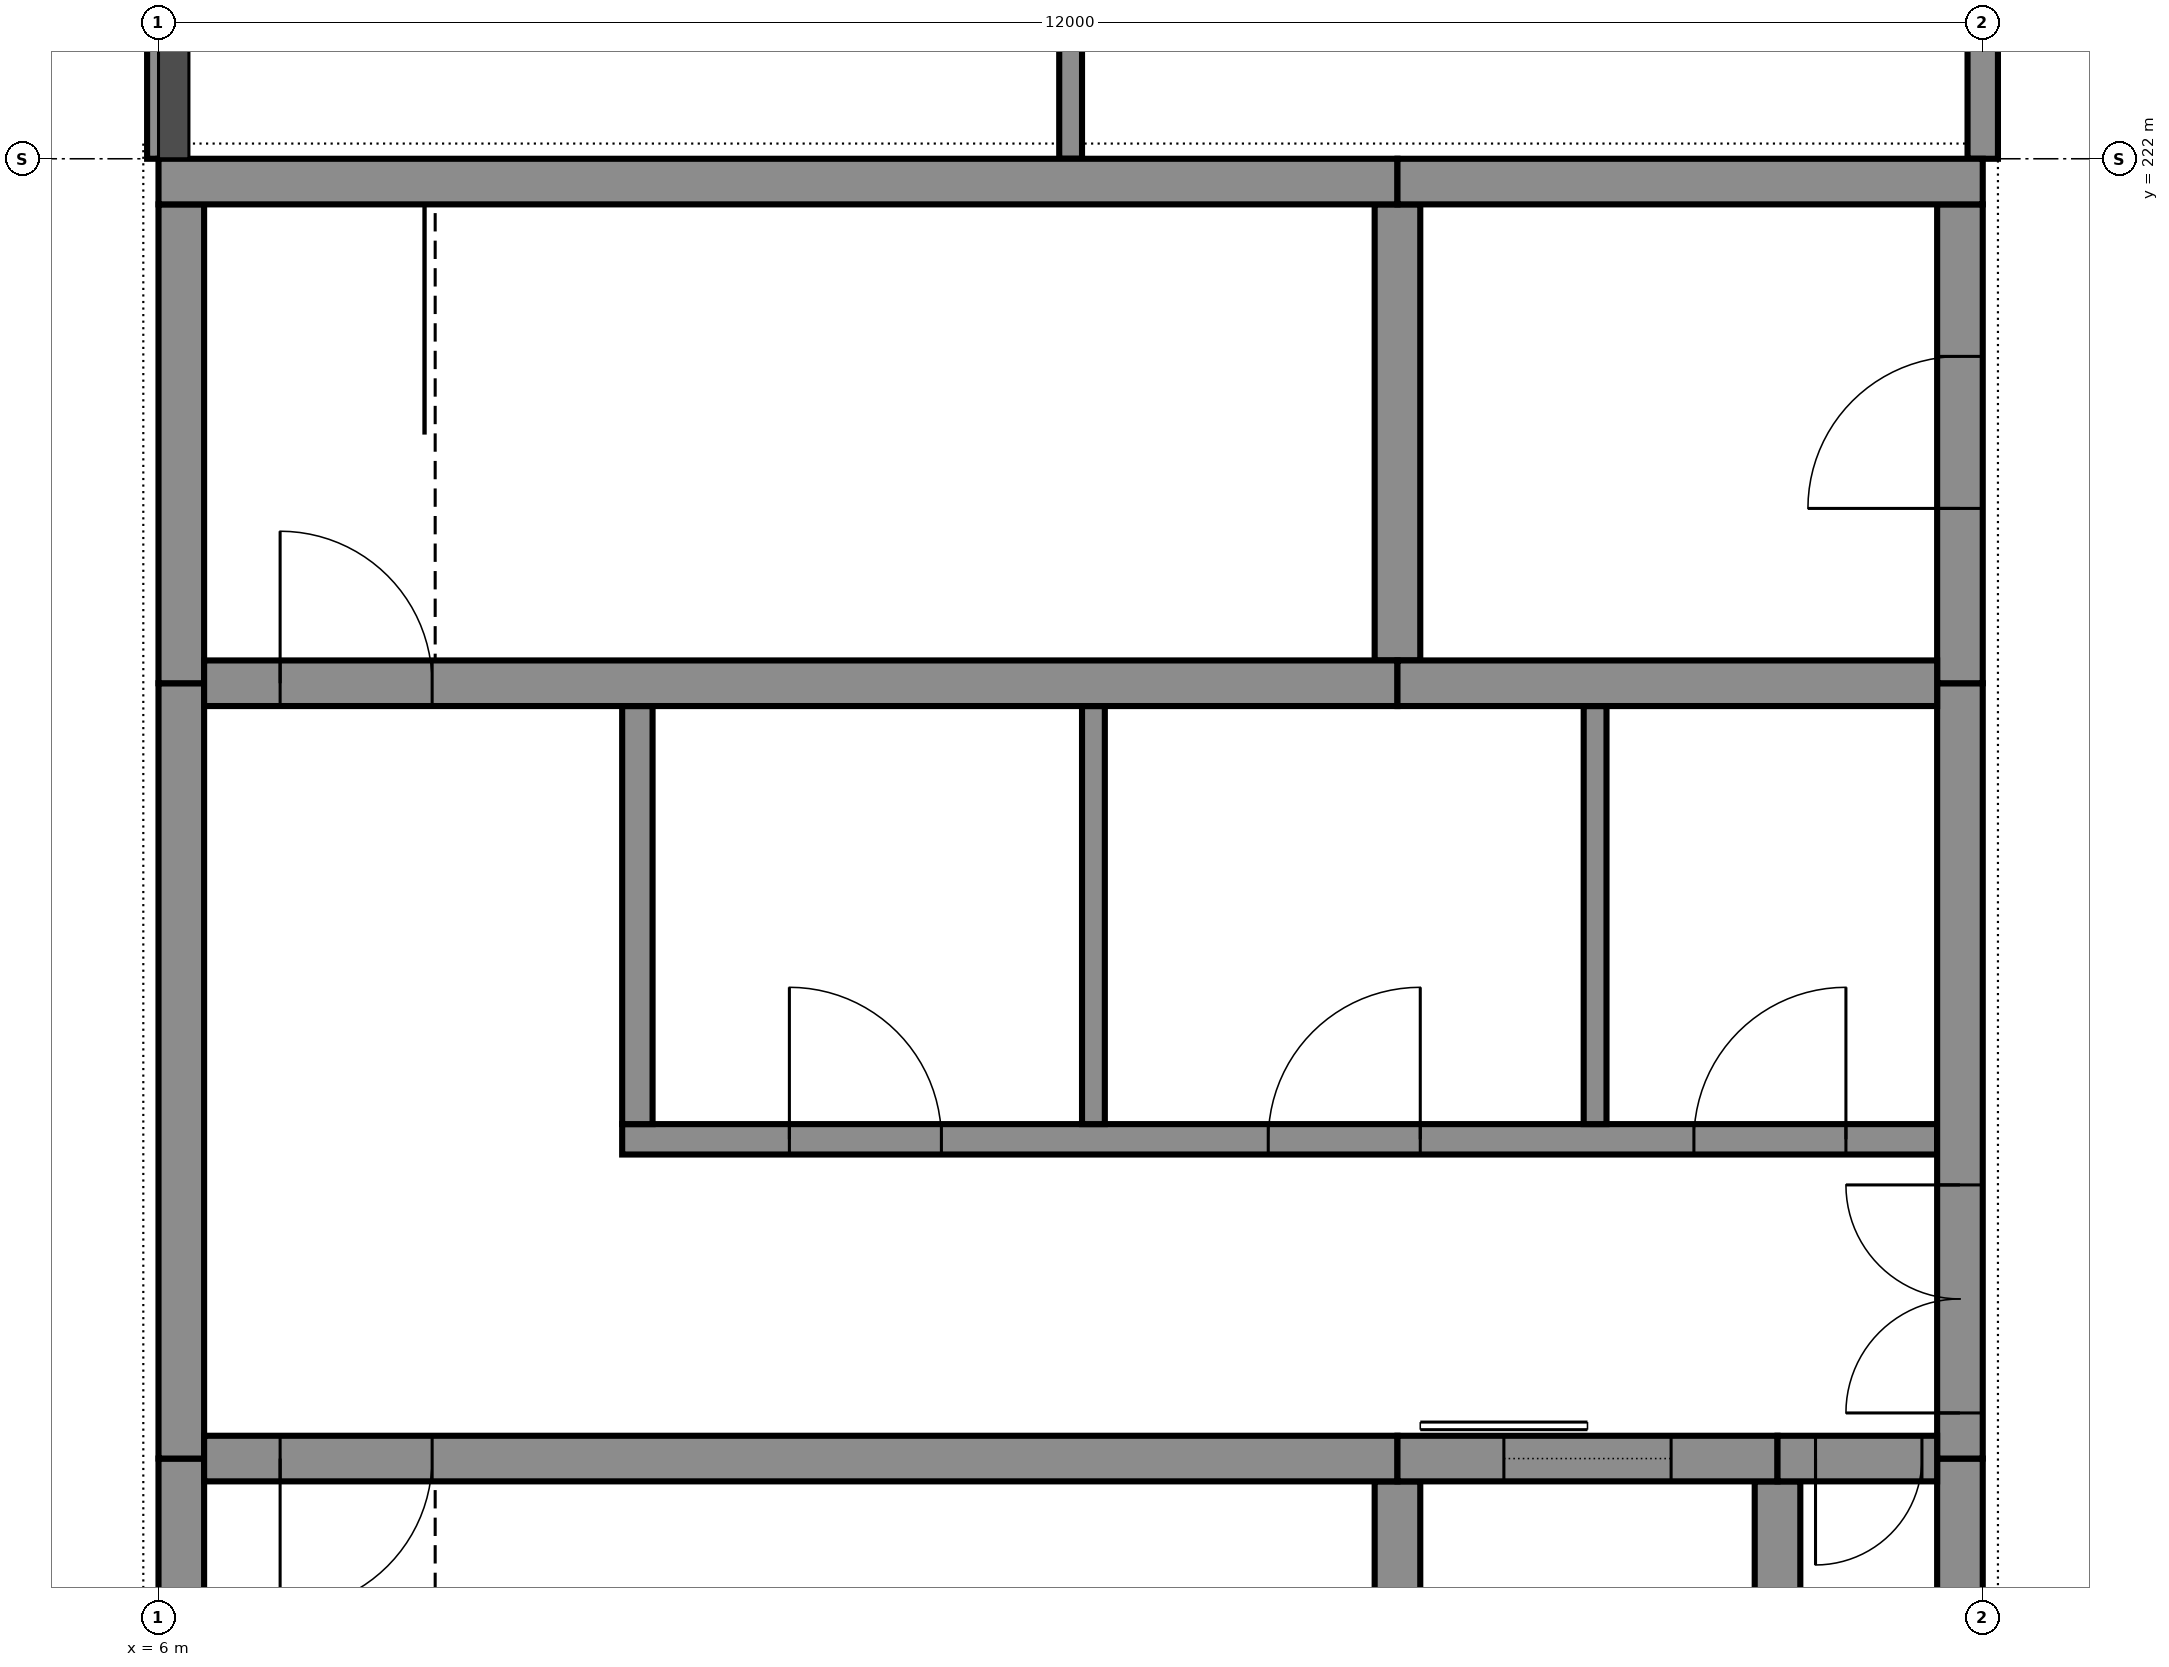
"""IFC4 building model, lengths in metres.
Left out: names, types, materials, properties, quantities, classifications, styles, units other than length and angle.
Written with IfcOpenShell. Run it as: python <this file> out.ifc"""

import sys

from ifc_helpers import new_model, si_unit, direction, frame, frame_2d, origin, place, context, subcontext, project, spatial, rectangle, extrude, element, fill, save


model = new_model("IFC4")
c1 = context("Model", 3, precision=1e-05, world=origin(), true_north=direction((0.0, 1.0)))
c2 = subcontext(c1, "Body", "Model", "MODEL_VIEW")
j1 = project(units=[si_unit("LENGTHUNIT", "METRE"), si_unit("PLANEANGLEUNIT", "RADIAN")], contexts=[c1])
p1 = place(None, origin())
s1 = spatial("IfcSite", under=j1, at=p1, CompositionType="ELEMENT")
p2 = place(p1, origin())
s2 = spatial("IfcBuilding", under=s1, at=p2, CompositionType="ELEMENT")
p3 = place(p2, frame((0.0, 0.0, 17.0)))
s3 = spatial("IfcBuildingStorey", under=s2, at=p3, CompositionType="ELEMENT", Elevation=17.0)
p4 = place(p3, frame((6.0, 221.85, 0.0), z_axis=(0.0, 0.0, 1.0), x_axis=(1.0, 0.0, 0.0)))
e1 = element("IfcWall", 1, at=p4, inside=s3, PredefinedType="SHEAR", context=c2, shape_type="SweptSolid", body=[
    extrude(rectangle(XDim=8.15, YDim=0.3, at=frame_2d((4.075, 0.0))), origin(), (0.0, 0.0, 1.0), 3.8),
])
p5 = place(p3, frame((14.15, 221.85, 0.0), z_axis=(0.0, 0.0, 1.0), x_axis=(1.0, 0.0, 0.0)))
e2 = element("IfcWall", 2, at=p5, inside=s3, PredefinedType="SHEAR", context=c2, shape_type="SweptSolid", body=[
    extrude(rectangle(XDim=3.85, YDim=0.3, at=frame_2d((1.925, 0.0))), origin(), (0.0, 0.0, 1.0), 3.8),
])
p6 = place(p3, frame((6.3, 213.45, 0.0), z_axis=(0.0, 0.0, 1.0), x_axis=(1.0, 0.0, 0.0)))
e3 = element("IfcWall", 3, at=p6, inside=s3, PredefinedType="SHEAR", context=c2, shape_type="SweptSolid", body=[
    extrude(rectangle(XDim=7.85, YDim=0.3, at=frame_2d((3.925, 0.0))), origin(), (0.0, 0.0, 1.0), 3.8),
])
p7 = place(p6, frame((0.5, 0.0, 0.0)))
e4 = element("IfcOpeningElement", 4, at=p7, cuts=e3, PredefinedType="OPENING", context=c2, shape_type="SweptSolid", body=[
    extrude(rectangle(XDim=1.0, YDim=2.1, at=frame_2d((0.5, 1.05))), frame((0.0, 0.16, 0.0), z_axis=(0.0, -1.0, 0.0), x_axis=(1.0, 0.0, 0.0)), (0.0, 0.0, 1.0), 0.32),
])
p8 = place(p3, frame((14.15, 213.45, 0.0), z_axis=(0.0, 0.0, 1.0), x_axis=(1.0, 0.0, 0.0)))
e5 = element("IfcWall", 5, at=p8, inside=s3, PredefinedType="SHEAR", context=c2, shape_type="SweptSolid", body=[
    extrude(rectangle(XDim=2.5, YDim=0.3, at=frame_2d((1.25, 0.0))), origin(), (0.0, 0.0, 1.0), 3.8),
])
p9 = place(p8, frame((0.7, 0.0, 0.0)))
e6 = element("IfcOpeningElement", 6, at=p9, cuts=e5, PredefinedType="OPENING", context=c2, shape_type="SweptSolid", body=[
    extrude(rectangle(XDim=1.1, YDim=2.1, at=frame_2d((0.55, 1.05))), frame((0.0, 0.16, 0.0), z_axis=(0.0, -1.0, 0.0), x_axis=(1.0, 0.0, 0.0)), (0.0, 0.0, 1.0), 0.32),
])
p10 = place(p3, frame((16.65, 213.45, 0.0), z_axis=(0.0, 0.0, 1.0), x_axis=(1.0, 0.0, 0.0)))
e7 = element("IfcWall", 7, at=p10, inside=s3, PredefinedType="SHEAR", context=c2, shape_type="SweptSolid", body=[
    extrude(rectangle(XDim=1.05, YDim=0.3, at=frame_2d((0.525, 0.0))), origin(), (0.0, 0.0, 1.0), 3.8),
])
p11 = place(p10, frame((0.25, 0.0, 0.0)))
e8 = element("IfcOpeningElement", 8, at=p11, cuts=e7, PredefinedType="OPENING", context=c2, shape_type="SweptSolid", body=[
    extrude(rectangle(XDim=0.7, YDim=2.1, at=frame_2d((0.35, 1.05))), frame((0.0, 0.16, 0.0), z_axis=(0.0, -1.0, 0.0), x_axis=(1.0, 0.0, 0.0)), (0.0, 0.0, 1.0), 0.32),
])
p12 = place(p3, frame((6.3, 218.55, 0.0), z_axis=(0.0, 0.0, 1.0), x_axis=(1.0, 0.0, 0.0)))
e9 = element("IfcWall", 9, at=p12, inside=s3, PredefinedType="SHEAR", context=c2, shape_type="SweptSolid", body=[
    extrude(rectangle(XDim=7.85, YDim=0.3, at=frame_2d((3.925, 0.0))), origin(), (0.0, 0.0, 1.0), 3.8),
])
p13 = place(p12, frame((0.5, 0.0, 0.0)))
e10 = element("IfcOpeningElement", 10, at=p13, cuts=e9, PredefinedType="OPENING", context=c2, shape_type="SweptSolid", body=[
    extrude(rectangle(XDim=1.0, YDim=2.1, at=frame_2d((0.5, 1.05))), frame((0.0, 0.16, 0.0), z_axis=(0.0, -1.0, 0.0), x_axis=(1.0, 0.0, 0.0)), (0.0, 0.0, 1.0), 0.32),
])
p14 = place(p3, frame((14.15, 218.55, 0.0), z_axis=(0.0, 0.0, 1.0), x_axis=(1.0, 0.0, 0.0)))
e11 = element("IfcWall", 11, at=p14, inside=s3, PredefinedType="SHEAR", context=c2, shape_type="SweptSolid", body=[
    extrude(rectangle(XDim=3.55, YDim=0.3, at=frame_2d((1.775, 0.0))), origin(), (0.0, 0.0, 1.0), 3.8),
])
p15 = place(p3, frame((6.15, 210.0, 0.0), z_axis=(0.0, 0.0, 1.0), x_axis=(0.0, 1.0, 0.0)))
e12 = element("IfcWall", 12, at=p15, inside=s3, PredefinedType="SHEAR", context=c2, shape_type="SweptSolid", body=[
    extrude(rectangle(XDim=3.45, YDim=0.3, at=frame_2d((1.725, 0.0))), origin(), (0.0, 0.0, 1.0), 3.8),
])
p16 = place(p3, frame((6.15, 213.45, 0.0), z_axis=(0.0, 0.0, 1.0), x_axis=(0.0, 1.0, 0.0)))
e13 = element("IfcWall", 13, at=p16, inside=s3, PredefinedType="SHEAR", context=c2, shape_type="SweptSolid", body=[
    extrude(rectangle(XDim=5.1, YDim=0.3, at=frame_2d((2.55, 0.0))), origin(), (0.0, 0.0, 1.0), 3.8),
])
for number, where, z_axis, x_axis in (
    (14, (6.15, 218.55, 0.0), (0.0, 0.0, 1.0), (0.0, 1.0, 0.0)),
    (15, (17.85, 210.3, 0.0), (0.0, 0.0, 1.0), (0.0, 1.0, 0.0)),
):
    element("IfcWall", number, at=place(p3, frame(where, z_axis=z_axis, x_axis=x_axis)), inside=s3, PredefinedType="SHEAR", context=c2, shape_type="SweptSolid", body=[
        extrude(rectangle(XDim=3.15, YDim=0.3, at=frame_2d((1.575, 0.0))), origin(), (0.0, 0.0, 1.0), 3.8),
    ])
p17 = place(p3, frame((17.85, 213.45, 0.0), z_axis=(0.0, 0.0, 1.0), x_axis=(0.0, 1.0, 0.0)))
e16 = element("IfcWall", 16, at=p17, inside=s3, PredefinedType="SHEAR", context=c2, shape_type="SweptSolid", body=[
    extrude(rectangle(XDim=5.1, YDim=0.3, at=frame_2d((2.55, 0.0))), origin(), (0.0, 0.0, 1.0), 3.8),
])
p18 = place(p17, frame((0.3, 0.0, 0.0)))
e17 = element("IfcOpeningElement", 17, at=p18, cuts=e16, PredefinedType="OPENING", context=c2, shape_type="SweptSolid", body=[
    extrude(rectangle(XDim=1.5, YDim=2.1, at=frame_2d((0.75, 1.05))), frame((0.0, 0.16, 0.0), z_axis=(0.0, -1.0, 0.0), x_axis=(1.0, 0.0, 0.0)), (0.0, 0.0, 1.0), 0.32),
])
p19 = place(p3, frame((17.85, 218.55, 0.0), z_axis=(0.0, 0.0, 1.0), x_axis=(0.0, 1.0, 0.0)))
e18 = element("IfcWall", 18, at=p19, inside=s3, PredefinedType="SHEAR", context=c2, shape_type="SweptSolid", body=[
    extrude(rectangle(XDim=3.15, YDim=0.3, at=frame_2d((1.575, 0.0))), origin(), (0.0, 0.0, 1.0), 3.8),
])
p20 = place(p19, frame((1.15, 0.0, 0.0)))
e19 = element("IfcOpeningElement", 19, at=p20, cuts=e18, PredefinedType="OPENING", context=c2, shape_type="SweptSolid", body=[
    extrude(rectangle(XDim=1.0, YDim=2.1, at=frame_2d((0.5, 1.05))), frame((0.0, 0.16, 0.0), z_axis=(0.0, -1.0, 0.0), x_axis=(1.0, 0.0, 0.0)), (0.0, 0.0, 1.0), 0.32),
])
p21 = place(p3, frame((14.15, 210.0, 0.0), z_axis=(0.0, 0.0, 1.0), x_axis=(0.0, 1.0, 0.0)))
e20 = element("IfcWall", 20, at=p21, inside=s3, PredefinedType="SHEAR", context=c2, shape_type="SweptSolid", body=[
    extrude(rectangle(XDim=3.3, YDim=0.3, at=frame_2d((1.65, 0.0))), origin(), (0.0, 0.0, 1.0), 3.8),
])
for number, where, z_axis, x_axis in (
    (21, (14.15, 218.7, 0.0), (0.0, 0.0, 1.0), (0.0, 1.0, 0.0)),
    (22, (16.65, 210.3, 0.0), (0.0, 0.0, 1.0), (0.0, 1.0, 0.0)),
):
    element("IfcWall", number, at=place(p3, frame(where, z_axis=z_axis, x_axis=x_axis)), inside=s3, PredefinedType="SHEAR", context=c2, shape_type="SweptSolid", body=[
        extrude(rectangle(XDim=3.0, YDim=0.3, at=frame_2d((1.5, 0.0))), origin(), (0.0, 0.0, 1.0), 3.8),
    ])
p22 = place(p3, frame((9.05, 215.55, 0.0), z_axis=(0.0, 0.0, 1.0), x_axis=(1.0, 0.0, 0.0)))
e23 = element("IfcWall", 23, at=p22, inside=s3, PredefinedType="PARTITIONING", context=c2, shape_type="SweptSolid", body=[
    extrude(rectangle(XDim=8.65, YDim=0.2, at=frame_2d((4.325, 0.0))), origin(), (0.0, 0.0, 1.0), 3.8),
])
p23 = place(p22, frame((1.1, 0.0, 0.0)))
e24 = element("IfcOpeningElement", 24, at=p23, cuts=e23, PredefinedType="OPENING", context=c2, shape_type="SweptSolid", body=[
    extrude(rectangle(XDim=1.0, YDim=2.1, at=frame_2d((0.5, 1.05))), frame((0.0, 0.11, 0.0), z_axis=(0.0, -1.0, 0.0), x_axis=(1.0, 0.0, 0.0)), (0.0, 0.0, 1.0), 0.22),
])
p24 = place(p22, frame((4.25, 0.0, 0.0)))
e25 = element("IfcOpeningElement", 25, at=p24, cuts=e23, PredefinedType="OPENING", context=c2, shape_type="SweptSolid", body=[
    extrude(rectangle(XDim=1.0, YDim=2.1, at=frame_2d((0.5, 1.05))), frame((0.0, 0.11, 0.0), z_axis=(0.0, -1.0, 0.0), x_axis=(1.0, 0.0, 0.0)), (0.0, 0.0, 1.0), 0.22),
])
p25 = place(p22, frame((7.05, 0.0, 0.0)))
e26 = element("IfcOpeningElement", 26, at=p25, cuts=e23, PredefinedType="OPENING", context=c2, shape_type="SweptSolid", body=[
    extrude(rectangle(XDim=1.0, YDim=2.1, at=frame_2d((0.5, 1.05))), frame((0.0, 0.11, 0.0), z_axis=(0.0, -1.0, 0.0), x_axis=(1.0, 0.0, 0.0)), (0.0, 0.0, 1.0), 0.22),
])
p26 = place(p3, frame((6.0, 222.0, 0.0), z_axis=(0.0, 0.0, 1.0), x_axis=(0.0, 1.0, 0.0)))
e27 = element("IfcWall", 27, at=p26, inside=s3, PredefinedType="PARTITIONING", context=c2, shape_type="SweptSolid", body=[
    extrude(rectangle(XDim=7.1, YDim=0.15, at=frame_2d((3.55, 0.0))), origin(), (0.0, 0.0, 1.0), 3.0),
])
p27 = place(p3, frame((9.15, 215.65, 0.0), z_axis=(0.0, 0.0, 1.0), x_axis=(0.0, 1.0, 0.0)))
e28 = element("IfcWall", 28, at=p27, inside=s3, PredefinedType="PARTITIONING", context=c2, shape_type="SweptSolid", body=[
    extrude(rectangle(XDim=2.75, YDim=0.2, at=frame_2d((1.375, 0.0))), origin(), (0.0, 0.0, 1.0), 3.8),
])
p28 = place(p3, frame((12.0, 222.0, 0.0), z_axis=(0.0, 0.0, 1.0), x_axis=(0.0, 1.0, 0.0)))
e29 = element("IfcWall", 29, at=p28, inside=s3, PredefinedType="PARTITIONING", context=c2, shape_type="SweptSolid", body=[
    extrude(rectangle(XDim=7.1, YDim=0.15, at=frame_2d((3.55, 0.0))), origin(), (0.0, 0.0, 1.0), 3.8),
])
for number, where, z_axis, x_axis in (
    (30, (12.15, 215.65, 0.0), (0.0, 0.0, 1.0), (0.0, 1.0, 0.0)),
    (31, (15.45, 215.65, 0.0), (0.0, 0.0, 1.0), (0.0, 1.0, 0.0)),
):
    element("IfcWall", number, at=place(p3, frame(where, z_axis=z_axis, x_axis=x_axis)), inside=s3, PredefinedType="PARTITIONING", context=c2, shape_type="SweptSolid", body=[
        extrude(rectangle(XDim=2.75, YDim=0.15, at=frame_2d((1.375, 0.0))), origin(), (0.0, 0.0, 1.0), 3.8),
    ])
p29 = place(p3, frame((18.0, 222.0, 0.0), z_axis=(0.0, 0.0, 1.0), x_axis=(0.0, 1.0, 0.0)))
e32 = element("IfcWall", 32, at=p29, inside=s3, PredefinedType="PARTITIONING", context=c2, shape_type="SweptSolid", body=[
    extrude(rectangle(XDim=7.1, YDim=0.2, at=frame_2d((3.55, 0.0))), origin(), (0.0, 0.0, 1.0), 3.0),
])
p30 = place(p29, frame((3.1, 0.0, 0.0)))
e33 = element("IfcOpeningElement", 33, at=p30, cuts=e32, PredefinedType="OPENING", context=c2, shape_type="SweptSolid", body=[
    extrude(rectangle(XDim=1.0, YDim=2.1, at=frame_2d((0.5, 1.05))), frame((0.0, 0.11, 0.0), z_axis=(0.0, -1.0, 0.0), x_axis=(1.0, 0.0, 0.0)), (0.0, 0.0, 1.0), 0.22),
])
p31 = place(p7, frame((1.0, 0.0, 0.0), z_axis=(0.0, 0.0, 1.0), x_axis=(-1.0, 0.0, 0.0)))
e34 = element("IfcDoor", 34, at=p31, inside=s3, OperationType="SINGLE_SWING_LEFT", PredefinedType="DOOR", context=c2, shape_type="SweptSolid", body=[
    extrude(rectangle(XDim=1.0, YDim=2.1, at=frame_2d((0.5, 1.05))), frame((0.0, 0.025, 0.0), z_axis=(0.0, -1.0, 0.0), x_axis=(1.0, 0.0, 0.0)), (0.0, 0.0, 1.0), 0.05),
])
fill(e4, e34)
p32 = place(p9, origin())
e35 = element("IfcDoor", 35, at=p32, inside=s3, OperationType="SLIDING_TO_LEFT", PredefinedType="DOOR", context=c2, shape_type="SweptSolid", body=[
    extrude(rectangle(XDim=1.1, YDim=2.1, at=frame_2d((0.55, 1.05))), frame((0.0, 0.025, 0.0), z_axis=(0.0, -1.0, 0.0), x_axis=(1.0, 0.0, 0.0)), (0.0, 0.0, 1.0), 0.05),
])
fill(e6, e35)
p33 = place(p11, frame((0.7, 0.0, 0.0), z_axis=(0.0, 0.0, 1.0), x_axis=(-1.0, 0.0, 0.0)))
e36 = element("IfcDoor", 36, at=p33, inside=s3, OperationType="SINGLE_SWING_LEFT", PredefinedType="DOOR", context=c2, shape_type="SweptSolid", body=[
    extrude(rectangle(XDim=0.7, YDim=2.1, at=frame_2d((0.35, 1.05))), frame((0.0, 0.025, 0.0), z_axis=(0.0, -1.0, 0.0), x_axis=(1.0, 0.0, 0.0)), (0.0, 0.0, 1.0), 0.05),
])
fill(e8, e36)
p34 = place(p18, origin())
e37 = element("IfcDoor", 37, at=p34, inside=s3, OperationType="DOUBLE_DOOR_SINGLE_SWING", PredefinedType="DOOR", context=c2, shape_type="SweptSolid", body=[
    extrude(rectangle(XDim=1.5, YDim=2.1, at=frame_2d((0.75, 1.05))), frame((0.0, 0.025, 0.0), z_axis=(0.0, -1.0, 0.0), x_axis=(1.0, 0.0, 0.0)), (0.0, 0.0, 1.0), 0.05),
])
fill(e17, e37)
p35 = place(p23, origin())
e38 = element("IfcDoor", 38, at=p35, inside=s3, OperationType="SINGLE_SWING_RIGHT", PredefinedType="DOOR", context=c2, shape_type="SweptSolid", body=[
    extrude(rectangle(XDim=1.0, YDim=2.1, at=frame_2d((0.5, 1.05))), frame((0.0, 0.025, 0.0), z_axis=(0.0, -1.0, 0.0), x_axis=(1.0, 0.0, 0.0)), (0.0, 0.0, 1.0), 0.05),
])
fill(e24, e38)
p36 = place(p24, origin())
e39 = element("IfcDoor", 39, at=p36, inside=s3, OperationType="SINGLE_SWING_LEFT", PredefinedType="DOOR", context=c2, shape_type="SweptSolid", body=[
    extrude(rectangle(XDim=1.0, YDim=2.1, at=frame_2d((0.5, 1.05))), frame((0.0, 0.025, 0.0), z_axis=(0.0, -1.0, 0.0), x_axis=(1.0, 0.0, 0.0)), (0.0, 0.0, 1.0), 0.05),
])
fill(e25, e39)
p37 = place(p25, origin())
e40 = element("IfcDoor", 40, at=p37, inside=s3, OperationType="SINGLE_SWING_LEFT", PredefinedType="DOOR", context=c2, shape_type="SweptSolid", body=[
    extrude(rectangle(XDim=1.0, YDim=2.1, at=frame_2d((0.5, 1.05))), frame((0.0, 0.025, 0.0), z_axis=(0.0, -1.0, 0.0), x_axis=(1.0, 0.0, 0.0)), (0.0, 0.0, 1.0), 0.05),
])
fill(e26, e40)
p38 = place(p13, origin())
e41 = element("IfcDoor", 41, at=p38, inside=s3, OperationType="SINGLE_SWING_RIGHT", PredefinedType="DOOR", context=c2, shape_type="SweptSolid", body=[
    extrude(rectangle(XDim=1.0, YDim=2.1, at=frame_2d((0.5, 1.05))), frame((0.0, 0.025, 0.0), z_axis=(0.0, -1.0, 0.0), x_axis=(1.0, 0.0, 0.0)), (0.0, 0.0, 1.0), 0.05),
])
fill(e10, e41)
p39 = place(p20, origin())
e42 = element("IfcDoor", 42, at=p39, inside=s3, OperationType="SINGLE_SWING_RIGHT", PredefinedType="DOOR", context=c2, shape_type="SweptSolid", body=[
    extrude(rectangle(XDim=1.0, YDim=2.1, at=frame_2d((0.5, 1.05))), frame((0.0, 0.025, 0.0), z_axis=(0.0, -1.0, 0.0), x_axis=(1.0, 0.0, 0.0)), (0.0, 0.0, 1.0), 0.05),
])
fill(e19, e42)
save(model, sys.argv[1])
